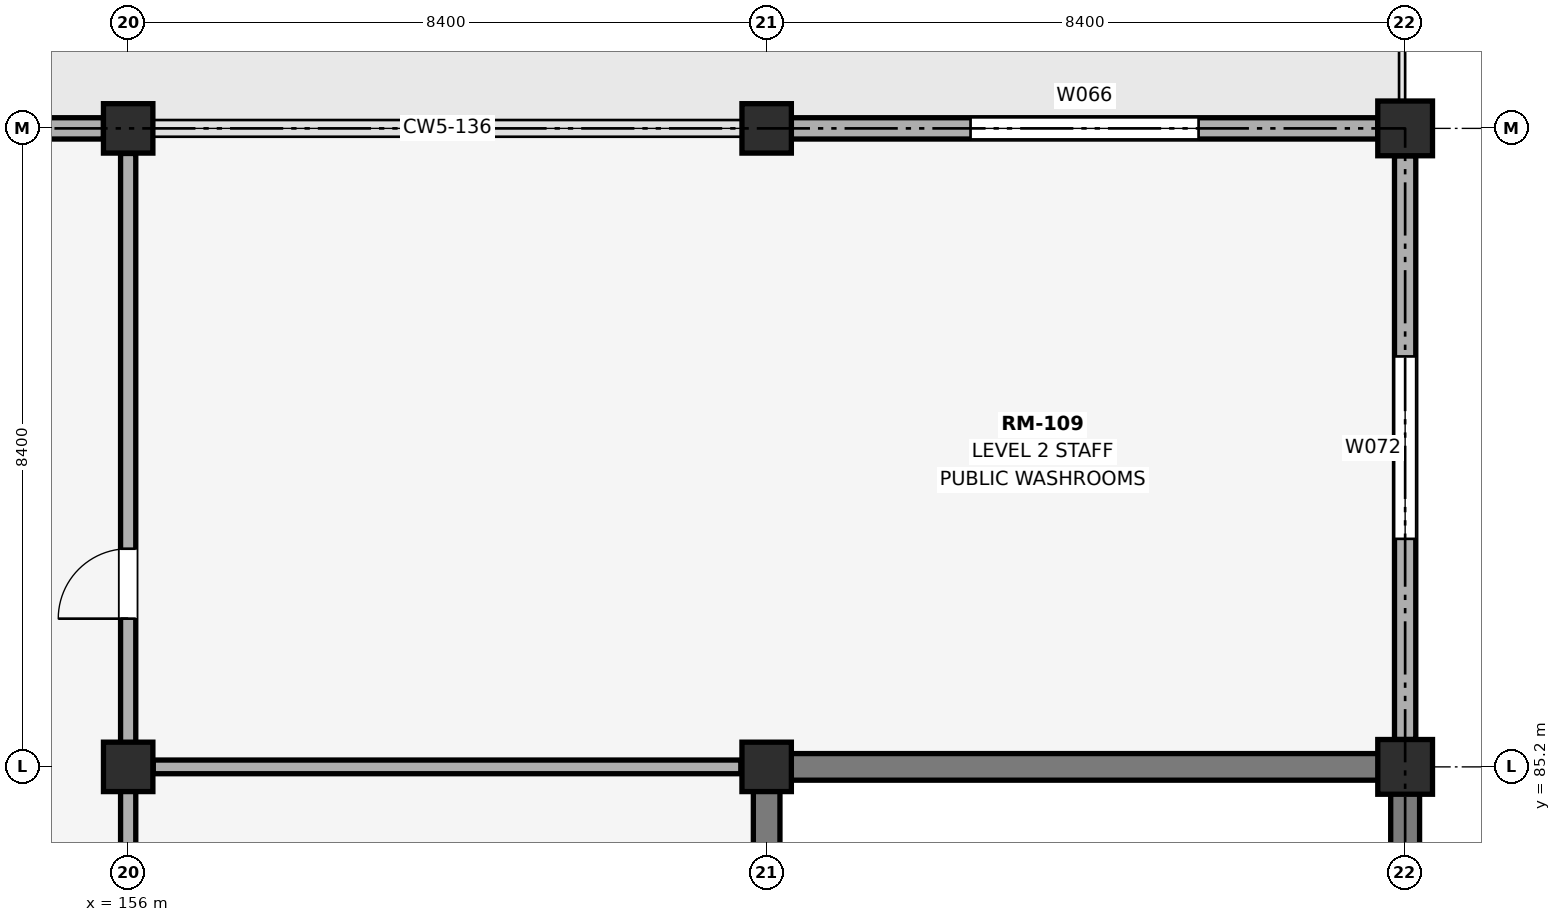
"""IFC4 building model, lengths in metres.
Left out: names, types, materials, properties, quantities, classifications, styles, units other than length and angle.
Written with IfcOpenShell. Run it as: python <this file> out.ifc"""

import sys

from ifc_helpers import new_model, si_unit, direction, frame, frame_2d, origin, origin_2d, place, context, subcontext, project, spatial, rectangle, extrude, element, fill, save


model = new_model("IFC4")
c1 = context("Model", 3, precision=1e-05, world=origin(), true_north=direction((0.0, 1.0)))
c2 = subcontext(c1, "Body", "Model", "MODEL_VIEW")
j1 = project(units=[si_unit("LENGTHUNIT", "METRE"), si_unit("PLANEANGLEUNIT", "RADIAN")], contexts=[c1])
p1 = place(None, origin())
s1 = spatial("IfcSite", under=j1, at=p1, CompositionType="ELEMENT")
p2 = place(p1, origin())
s2 = spatial("IfcBuilding", under=s1, at=p2, CompositionType="ELEMENT")
p3 = place(p2, frame((0.0, 0.0, 10.2)))
s3 = spatial("IfcBuildingStorey", under=s2, at=p3, CompositionType="ELEMENT", Elevation=10.2)
for number, where, z_axis, x_axis in (
    (1, (156.0, 85.2, 0.0), (0.0, 0.0, 1.0), (1.0, 0.0, 0.0)),
    (2, (156.0, 93.6, 0.0), (0.0, 0.0, 1.0), (1.0, 0.0, 0.0)),
    (3, (164.4, 85.2, 0.0), (0.0, 0.0, 1.0), (1.0, 0.0, 0.0)),
    (4, (164.4, 93.6, 0.0), (0.0, 0.0, 1.0), (1.0, 0.0, 0.0)),
):
    element("IfcColumn", number, at=place(p3, frame(where, z_axis=z_axis, x_axis=x_axis)), inside=s3, PredefinedType="COLUMN", context=c2, shape_type="SweptSolid", body=[
        extrude(rectangle(XDim=0.65, YDim=0.65, at=origin_2d()), origin(), (0.0, 0.0, 1.0), 4.8),
    ])
for number, where, z_axis, x_axis in (
    (5, (172.8, 85.2, 0.0), (0.0, 0.0, 1.0), (1.0, 0.0, 0.0)),
    (6, (172.8, 93.6, 0.0), (0.0, 0.0, 1.0), (1.0, 0.0, 0.0)),
):
    element("IfcColumn", number, at=place(p3, frame(where, z_axis=z_axis, x_axis=x_axis)), inside=s3, PredefinedType="COLUMN", context=c2, shape_type="SweptSolid", body=[
        extrude(rectangle(XDim=0.72, YDim=0.72, at=origin_2d()), origin(), (0.0, 0.0, 1.0), 4.8),
    ])
p4 = place(p3, frame((164.225, 85.2, 0.0), z_axis=(0.0, 0.0, 1.0), x_axis=(1.0, 0.0, 0.0)))
e7 = element("IfcWall", 7, at=p4, inside=s3, PredefinedType="SHEAR", context=c2, shape_type="SweptSolid", body=[
    extrude(rectangle(XDim=8.75, YDim=0.35, at=frame_2d((4.375, 0.0))), origin(), (0.0, 0.0, 1.0), 4.8),
])
p5 = place(p3, frame((164.4, 77.575, 0.0), z_axis=(0.0, 0.0, 1.0), x_axis=(0.0, 1.0, 0.0)))
e8 = element("IfcWall", 8, at=p5, inside=s3, PredefinedType="SHEAR", context=c2, shape_type="SweptSolid", body=[
    extrude(rectangle(XDim=7.45, YDim=0.35, at=frame_2d((3.725, 0.0))), origin(), (0.0, 0.0, 1.0), 4.8),
])
p6 = place(p5, frame((2.1, 0.0, 0.0)))
e9 = element("IfcOpeningElement", 9, at=p6, cuts=e8, PredefinedType="OPENING", context=c2, shape_type="SweptSolid", body=[
    extrude(rectangle(XDim=1.1, YDim=2.2, at=frame_2d((0.55, 1.1))), frame((0.0, 0.185, 0.0), z_axis=(0.0, -1.0, 0.0), x_axis=(1.0, 0.0, 0.0)), (0.0, 0.0, 1.0), 0.37),
])
p7 = place(p3, frame((172.8, 77.575, 0.0), z_axis=(0.0, 0.0, 1.0), x_axis=(0.0, 1.0, 0.0)))
e10 = element("IfcWall", 10, at=p7, inside=s3, PredefinedType="SHEAR", context=c2, shape_type="SweptSolid", body=[
    extrude(rectangle(XDim=7.45, YDim=0.38, at=frame_2d((3.725, 0.0))), origin(), (0.0, 0.0, 1.0), 4.8),
])
p8 = place(p3, frame((147.925, 93.6, 0.0), z_axis=(0.0, 0.0, 1.0), x_axis=(1.0, 0.0, 0.0)))
e11 = element("IfcWall", 11, at=p8, inside=s3, PredefinedType="SOLIDWALL", context=c2, shape_type="SweptSolid", body=[
    extrude(rectangle(XDim=7.75, YDim=0.28, at=frame_2d((3.875, 0.0))), origin(), (0.0, 0.0, 1.0), 3.77),
])
p9 = place(p8, frame((2.975, 0.0, 0.0)))
e12 = element("IfcOpeningElement", 12, at=p9, cuts=e11, PredefinedType="OPENING", context=c2, shape_type="SweptSolid", body=[
    extrude(rectangle(XDim=1.8, YDim=2.3, at=frame_2d((0.9, 1.15))), frame((0.0, 0.15, 0.0), z_axis=(0.0, -1.0, 0.0), x_axis=(1.0, 0.0, 0.0)), (0.0, 0.0, 1.0), 0.3),
])
p10 = place(p3, frame((164.725, 93.6, 0.0), z_axis=(0.0, 0.0, 1.0), x_axis=(1.0, 0.0, 0.0)))
e13 = element("IfcWall", 13, at=p10, inside=s3, PredefinedType="SOLIDWALL", context=c2, shape_type="SweptSolid", body=[
    extrude(rectangle(XDim=7.715, YDim=0.28, at=frame_2d((3.857, 0.0))), origin(), (0.0, 0.0, 1.0), 3.77),
])
p11 = place(p10, frame((2.357, 0.0, 0.95)))
e14 = element("IfcOpeningElement", 14, at=p11, cuts=e13, PredefinedType="OPENING", context=c2, shape_type="SweptSolid", body=[
    extrude(rectangle(XDim=3.0, YDim=1.8, at=frame_2d((1.5, 0.9))), frame((0.0, 0.15, 0.0), z_axis=(0.0, -1.0, 0.0), x_axis=(1.0, 0.0, 0.0)), (0.0, 0.0, 1.0), 0.3),
])
p12 = place(p3, frame((172.8, 85.56, 0.0), z_axis=(0.0, 0.0, 1.0), x_axis=(0.0, 1.0, 0.0)))
e15 = element("IfcWall", 15, at=p12, inside=s3, PredefinedType="SOLIDWALL", context=c2, shape_type="SweptSolid", body=[
    extrude(rectangle(XDim=7.68, YDim=0.28, at=frame_2d((3.84, 0.0))), origin(), (0.0, 0.0, 1.0), 3.82),
])
p13 = place(p12, frame((2.64, 0.0, 0.9)))
e16 = element("IfcOpeningElement", 16, at=p13, cuts=e15, PredefinedType="OPENING", context=c2, shape_type="SweptSolid", body=[
    extrude(rectangle(XDim=2.4, YDim=2.1, at=frame_2d((1.2, 1.05))), frame((0.0, 0.15, 0.0), z_axis=(0.0, -1.0, 0.0), x_axis=(1.0, 0.0, 0.0)), (0.0, 0.0, 1.0), 0.3),
])
p14 = place(p3, frame((156.0, 24.15, 0.0), z_axis=(0.0, 0.0, 1.0), x_axis=(0.0, 1.0, 0.0)))
e17 = element("IfcWall", 17, at=p14, inside=s3, PredefinedType="PARTITIONING", context=c2, shape_type="SweptSolid", body=[
    extrude(rectangle(XDim=69.12, YDim=0.2, at=frame_2d((34.56, 0.0))), origin(), (0.0, 0.0, 1.0), 3.72),
])
p15 = place(p14, frame((8.0, 0.0, 0.0)))
e18 = element("IfcOpeningElement", 18, at=p15, cuts=e17, PredefinedType="OPENING", context=c2, shape_type="SweptSolid", body=[
    extrude(rectangle(XDim=1.05, YDim=2.25, at=frame_2d((0.525, 1.125))), frame((0.0, 0.11, 0.0), z_axis=(0.0, -1.0, 0.0), x_axis=(1.0, 0.0, 0.0)), (0.0, 0.0, 1.0), 0.22),
])
p16 = place(p14, frame((27.3, 0.0, 0.0)))
e19 = element("IfcOpeningElement", 19, at=p16, cuts=e17, PredefinedType="OPENING", context=c2, shape_type="SweptSolid", body=[
    extrude(rectangle(XDim=2.0, YDim=2.45, at=frame_2d((1.0, 1.225))), frame((0.0, 0.11, 0.0), z_axis=(0.0, -1.0, 0.0), x_axis=(1.0, 0.0, 0.0)), (0.0, 0.0, 1.0), 0.22),
])
p17 = place(p14, frame((63.0, 0.0, 0.0)))
e20 = element("IfcOpeningElement", 20, at=p17, cuts=e17, PredefinedType="OPENING", context=c2, shape_type="SweptSolid", body=[
    extrude(rectangle(XDim=0.92, YDim=2.15, at=frame_2d((0.46, 1.075))), frame((0.0, 0.11, 0.0), z_axis=(0.0, -1.0, 0.0), x_axis=(1.0, 0.0, 0.0)), (0.0, 0.0, 1.0), 0.22),
])
p18 = place(p3, frame((156.33, 85.2, 0.0), z_axis=(0.0, 0.0, 1.0), x_axis=(1.0, 0.0, 0.0)))
e21 = element("IfcWall", 21, at=p18, inside=s3, PredefinedType="PARTITIONING", context=c2, shape_type="SweptSolid", body=[
    extrude(rectangle(XDim=7.73, YDim=0.18, at=frame_2d((3.865, 0.0))), origin(), (0.0, 0.0, 1.0), 3.84),
])
p19 = place(p11, origin())
e22 = element("IfcWindow", 22, at=p19, inside=s3, PartitioningType="SINGLE_PANEL", PredefinedType="WINDOW", context=c2, shape_type="SweptSolid", body=[
    extrude(rectangle(XDim=3.0, YDim=1.8, at=frame_2d((1.5, 0.9))), frame((0.0, 0.03, 0.0), z_axis=(0.0, -1.0, 0.0), x_axis=(1.0, 0.0, 0.0)), (0.0, 0.0, 1.0), 0.06),
])
fill(e14, e22)
p20 = place(p13, origin())
e23 = element("IfcWindow", 23, at=p20, inside=s3, PartitioningType="SINGLE_PANEL", PredefinedType="WINDOW", context=c2, shape_type="SweptSolid", body=[
    extrude(rectangle(XDim=2.4, YDim=2.1, at=frame_2d((1.2, 1.05))), frame((0.0, 0.03, 0.0), z_axis=(0.0, -1.0, 0.0), x_axis=(1.0, 0.0, 0.0)), (0.0, 0.0, 1.0), 0.06),
])
fill(e16, e23)
p21 = place(p17, origin())
e24 = element("IfcDoor", 24, at=p21, inside=s3, OperationType="SINGLE_SWING_LEFT", PredefinedType="DOOR", context=c2, shape_type="SweptSolid", body=[
    extrude(rectangle(XDim=0.92, YDim=2.15, at=frame_2d((0.46, 1.075))), frame((0.0, 0.025, 0.0), z_axis=(0.0, -1.0, 0.0), x_axis=(1.0, 0.0, 0.0)), (0.0, 0.0, 1.0), 0.05),
])
fill(e20, e24)
save(model, sys.argv[1])
